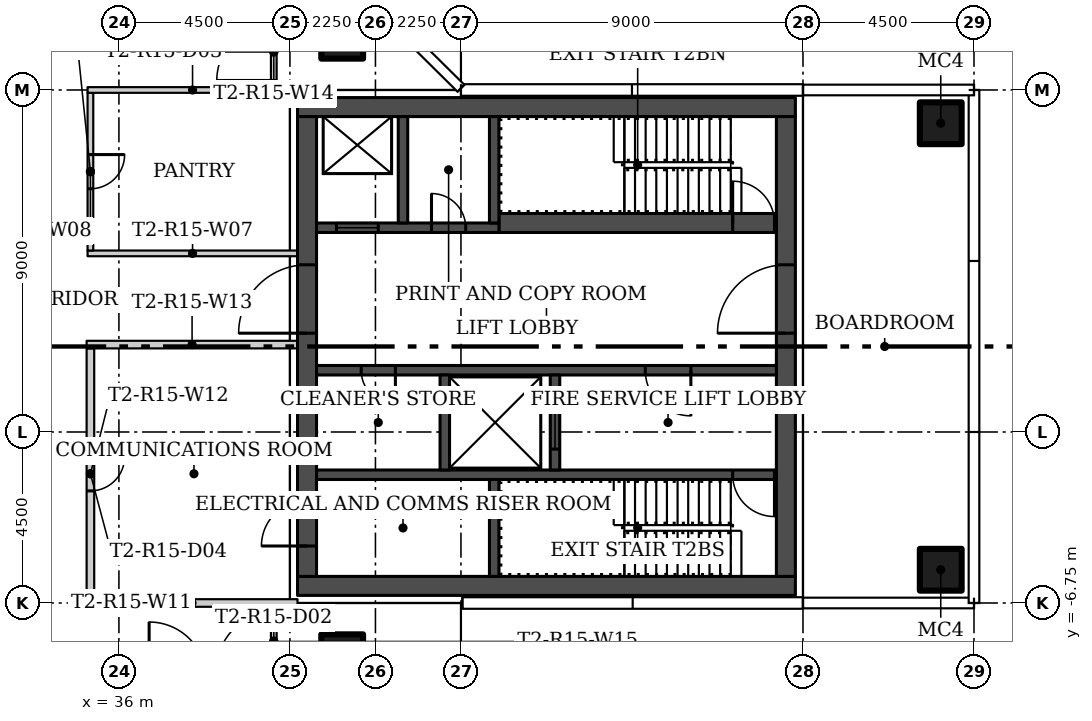
"""IFC4 building model, lengths in metres.
Left out: names, types, materials, properties, quantities, classifications, styles, units other than length and angle.
Written with IfcOpenShell. Run it as: python <this file> out.ifc"""

import sys

from ifc_helpers import new_model, si_unit, direction, frame, frame_2d, origin, origin_2d, place, context, subcontext, project, spatial, rectangle, hollow_rectangle, extrude, element, fill, save


model = new_model("IFC4")
c1 = context("Model", 3, precision=1e-05, world=origin(), true_north=direction((0.0, 1.0)))
c2 = subcontext(c1, "Body", "Model", "MODEL_VIEW")
j1 = project(units=[si_unit("LENGTHUNIT", "METRE"), si_unit("PLANEANGLEUNIT", "RADIAN")], contexts=[c1])
p1 = place(None, origin())
s1 = spatial("IfcSite", under=j1, at=p1, CompositionType="ELEMENT")
p2 = place(p1, origin())
s2 = spatial("IfcBuilding", under=s1, at=p2, CompositionType="ELEMENT")
p3 = place(p2, frame((0.0, 0.0, 142.8)))
s3 = spatial("IfcBuildingStorey", under=s2, at=p3, CompositionType="ELEMENT", Elevation=142.8)
for number, where in (
    (1, (41.875, 8.125, 0.0)),
    (2, (41.875, -8.125, 0.0)),
    (3, (57.625, -5.875, 0.0)),
    (4, (57.625, 5.875, 0.0)),
):
    element("IfcColumn", number, at=place(p3, frame(where)), inside=s3, PredefinedType="COLUMN", context=c2, shape_type="SweptSolid", body=[
        extrude(hollow_rectangle(XDim=1.1, YDim=1.1, WallThickness=0.04, at=origin_2d()), origin(), (0.0, 0.0, 1.0), 3.55),
    ])
p4 = place(p3, frame((35.175, 2.45, 0.0)))
e5 = element("IfcWall", 5, at=p4, inside=s3, PredefinedType="PARTITIONING", context=c2, shape_type="SweptSolid", body=[
    extrude(rectangle(XDim=5.525, YDim=0.15, at=frame_2d((2.762, 0.0))), origin(), (0.0, 0.0, 1.0), 3.55),
])
p5 = place(p3, frame((35.25, 6.675, 0.0), z_axis=(0.0, 0.0, 1.0), x_axis=(0.0, -1.0, 0.0)))
e6 = element("IfcWall", 6, at=p5, inside=s3, PredefinedType="PARTITIONING", context=c2, shape_type="SweptSolid", body=[
    extrude(rectangle(XDim=4.15, YDim=0.15, at=frame_2d((2.075, 0.0))), origin(), (0.0, 0.0, 1.0), 3.55),
])
p6 = place(p5, frame((1.625, 0.0, 0.0)))
e7 = element("IfcOpeningElement", 7, at=p6, cuts=e6, PredefinedType="OPENING", context=c2, shape_type="SweptSolid", body=[
    extrude(rectangle(XDim=0.9, YDim=2.1, at=frame_2d((0.45, 1.05))), frame((0.0, 0.085, 0.0), z_axis=(0.0, -1.0, 0.0), x_axis=(1.0, 0.0, 0.0)), (0.0, 0.0, 1.0), 0.17),
])
p7 = place(p3, frame((40.7, 6.75, 0.0), z_axis=(0.0, 0.0, 1.0), x_axis=(-1.0, 0.0, 0.0)))
e8 = element("IfcWall", 8, at=p7, inside=s3, PredefinedType="PARTITIONING", context=c2, shape_type="SweptSolid", body=[
    extrude(rectangle(XDim=5.525, YDim=0.15, at=frame_2d((2.762, 0.0))), origin(), (0.0, 0.0, 1.0), 3.55),
])
p8 = place(p3, frame((35.15, -6.75, 0.0)))
e9 = element("IfcWall", 9, at=p8, inside=s3, PredefinedType="PARTITIONING", context=c2, shape_type="SweptSolid", body=[
    extrude(rectangle(XDim=5.55, YDim=0.2, at=frame_2d((2.775, 0.0))), origin(), (0.0, 0.0, 1.0), 3.55),
])
p9 = place(p3, frame((35.25, -0.05, 0.0), z_axis=(0.0, 0.0, 1.0), x_axis=(0.0, -1.0, 0.0)))
e10 = element("IfcWall", 10, at=p9, inside=s3, PredefinedType="PARTITIONING", context=c2, shape_type="SweptSolid", body=[
    extrude(rectangle(XDim=6.6, YDim=0.2, at=frame_2d((3.3, 0.0))), origin(), (0.0, 0.0, 1.0), 3.55),
])
p10 = place(p9, frame((2.85, 0.0, 0.0)))
e11 = element("IfcOpeningElement", 11, at=p10, cuts=e10, PredefinedType="OPENING", context=c2, shape_type="SweptSolid", body=[
    extrude(rectangle(XDim=0.9, YDim=2.1, at=frame_2d((0.45, 1.05))), frame((0.0, 0.11, 0.0), z_axis=(0.0, -1.0, 0.0), x_axis=(1.0, 0.0, 0.0)), (0.0, 0.0, 1.0), 0.22),
])
p11 = place(p3, frame((40.7, 0.05, 0.0), z_axis=(0.0, 0.0, 1.0), x_axis=(-1.0, 0.0, 0.0)))
e12 = element("IfcWall", 12, at=p11, inside=s3, PredefinedType="PARTITIONING", context=c2, shape_type="SweptSolid", body=[
    extrude(rectangle(XDim=5.55, YDim=0.2, at=frame_2d((2.775, 0.0))), origin(), (0.0, 0.0, 1.0), 3.55),
])
p12 = place(p3, frame((40.075, 6.825, 0.0), z_axis=(0.0, 0.0, 1.0), x_axis=(0.0, 1.0, 0.0)))
e13 = element("IfcWall", 13, at=p12, inside=s3, PredefinedType="PARTITIONING", context=c2, shape_type="SweptSolid", body=[
    extrude(rectangle(XDim=1.85, YDim=0.15, at=frame_2d((0.925, 0.0))), origin(), (0.0, 0.0, 1.0), 3.55),
])
p13 = place(p12, frame((0.175, 0.0, 0.0)))
e14 = element("IfcOpeningElement", 14, at=p13, cuts=e13, PredefinedType="OPENING", context=c2, shape_type="SweptSolid", body=[
    extrude(rectangle(XDim=1.5, YDim=2.1, at=frame_2d((0.75, 1.05))), frame((0.0, 0.085, 0.0), z_axis=(0.0, -1.0, 0.0), x_axis=(1.0, 0.0, 0.0)), (0.0, 0.0, 1.0), 0.17),
])
p14 = place(p3, frame((40.075, -8.675, 0.0), z_axis=(0.0, 0.0, 1.0), x_axis=(0.0, 1.0, 0.0)))
e15 = element("IfcWall", 15, at=p14, inside=s3, PredefinedType="PARTITIONING", context=c2, shape_type="SweptSolid", body=[
    extrude(rectangle(XDim=1.825, YDim=0.15, at=frame_2d((0.913, 0.0))), origin(), (0.0, 0.0, 1.0), 3.55),
])
p15 = place(p14, frame((0.175, 0.0, 0.0)))
e16 = element("IfcOpeningElement", 16, at=p15, cuts=e15, PredefinedType="OPENING", context=c2, shape_type="SweptSolid", body=[
    extrude(rectangle(XDim=1.5, YDim=2.1, at=frame_2d((0.75, 1.05))), frame((0.0, 0.085, 0.0), z_axis=(0.0, -1.0, 0.0), x_axis=(1.0, 0.0, 0.0)), (0.0, 0.0, 1.0), 0.17),
])
for number, where, z_axis, x_axis in (
    (17, (53.8, -6.3, 0.0), (0.0, 0.0, 1.0), (-1.0, 0.0, 0.0)),
    (18, (53.8, 6.3, 0.0), (0.0, 0.0, 1.0), (-1.0, 0.0, 0.0)),
):
    element("IfcWall", number, at=place(p3, frame(where, z_axis=z_axis, x_axis=x_axis)), inside=s3, PredefinedType="SHEAR", context=c2, shape_type="SweptSolid", body=[
        extrude(rectangle(XDim=13.1, YDim=0.5, at=frame_2d((6.55, 0.0))), origin(), (0.0, 0.0, 1.0), 3.55),
    ])
p16 = place(p3, frame((53.55, -6.05, 0.0), z_axis=(0.0, 0.0, 1.0), x_axis=(0.0, 1.0, 0.0)))
e19 = element("IfcWall", 19, at=p16, inside=s3, PredefinedType="SHEAR", context=c2, shape_type="SweptSolid", body=[
    extrude(rectangle(XDim=12.1, YDim=0.5, at=frame_2d((6.05, 0.0))), origin(), (0.0, 0.0, 1.0), 3.55),
])
p17 = place(p16, frame((6.4, 0.0, 0.0)))
e20 = element("IfcOpeningElement", 20, at=p17, cuts=e19, PredefinedType="OPENING", context=c2, shape_type="SweptSolid", body=[
    extrude(rectangle(XDim=1.8, YDim=2.4, at=frame_2d((0.9, 1.2))), frame((0.0, 0.26, 0.0), z_axis=(0.0, -1.0, 0.0), x_axis=(1.0, 0.0, 0.0)), (0.0, 0.0, 1.0), 0.52),
])
p18 = place(p3, frame((40.95, -6.05, 0.0), z_axis=(0.0, 0.0, 1.0), x_axis=(0.0, 1.0, 0.0)))
e21 = element("IfcWall", 21, at=p18, inside=s3, PredefinedType="SHEAR", context=c2, shape_type="SweptSolid", body=[
    extrude(rectangle(XDim=12.1, YDim=0.5, at=frame_2d((6.05, 0.0))), origin(), (0.0, 0.0, 1.0), 3.55),
])
p19 = place(p18, frame((0.8, 0.0, 0.0)))
e22 = element("IfcOpeningElement", 22, at=p19, cuts=e21, PredefinedType="OPENING", context=c2, shape_type="SweptSolid", body=[
    extrude(rectangle(XDim=1.2, YDim=2.1, at=frame_2d((0.6, 1.05))), frame((0.0, 0.26, 0.0), z_axis=(0.0, -1.0, 0.0), x_axis=(1.0, 0.0, 0.0)), (0.0, 0.0, 1.0), 0.52),
])
p20 = place(p18, frame((6.4, 0.0, 0.0)))
e23 = element("IfcOpeningElement", 23, at=p20, cuts=e21, PredefinedType="OPENING", context=c2, shape_type="SweptSolid", body=[
    extrude(rectangle(XDim=1.8, YDim=2.4, at=frame_2d((0.9, 1.2))), frame((0.0, 0.26, 0.0), z_axis=(0.0, -1.0, 0.0), x_axis=(1.0, 0.0, 0.0)), (0.0, 0.0, 1.0), 0.52),
])
p21 = place(p3, frame((53.3, -3.375, 0.0), z_axis=(0.0, 0.0, 1.0), x_axis=(-1.0, 0.0, 0.0)))
e24 = element("IfcWall", 24, at=p21, inside=s3, PredefinedType="SHEAR", context=c2, shape_type="SweptSolid", body=[
    extrude(rectangle(XDim=12.1, YDim=0.25, at=frame_2d((6.05, 0.0))), origin(), (0.0, 0.0, 1.0), 3.55),
])
p22 = place(p21, frame((0.05, 0.0, 0.0)))
e25 = element("IfcOpeningElement", 25, at=p22, cuts=e24, PredefinedType="OPENING", context=c2, shape_type="SweptSolid", body=[
    extrude(rectangle(XDim=1.1, YDim=2.1, at=frame_2d((0.55, 1.05))), frame((0.0, 0.135, 0.0), z_axis=(0.0, -1.0, 0.0), x_axis=(1.0, 0.0, 0.0)), (0.0, 0.0, 1.0), 0.27),
])
p23 = place(p3, frame((45.875, -6.05, 0.0), z_axis=(0.0, 0.0, 1.0), x_axis=(0.0, 1.0, 0.0)))
e26 = element("IfcWall", 26, at=p23, inside=s3, PredefinedType="SHEAR", context=c2, shape_type="SweptSolid", body=[
    extrude(rectangle(XDim=2.55, YDim=0.25, at=frame_2d((1.275, 0.0))), origin(), (0.0, 0.0, 1.0), 3.55),
])
p24 = place(p3, frame((53.3, -0.625, 0.0), z_axis=(0.0, 0.0, 1.0), x_axis=(-1.0, 0.0, 0.0)))
e27 = element("IfcWall", 27, at=p24, inside=s3, PredefinedType="SHEAR", context=c2, shape_type="SweptSolid", body=[
    extrude(rectangle(XDim=12.1, YDim=0.25, at=frame_2d((6.05, 0.0))), origin(), (0.0, 0.0, 1.0), 3.55),
])
p25 = place(p24, frame((2.25, 0.0, 0.0)))
e28 = element("IfcOpeningElement", 28, at=p25, cuts=e27, PredefinedType="OPENING", context=c2, shape_type="SweptSolid", body=[
    extrude(rectangle(XDim=1.2, YDim=2.1, at=frame_2d((0.6, 1.05))), frame((0.0, 0.135, 0.0), z_axis=(0.0, -1.0, 0.0), x_axis=(1.0, 0.0, 0.0)), (0.0, 0.0, 1.0), 0.27),
])
p26 = place(p24, frame((10.025, 0.0, 0.0)))
e29 = element("IfcOpeningElement", 29, at=p26, cuts=e27, PredefinedType="OPENING", context=c2, shape_type="SweptSolid", body=[
    extrude(rectangle(XDim=0.9, YDim=2.1, at=frame_2d((0.45, 1.05))), frame((0.0, 0.135, 0.0), z_axis=(0.0, -1.0, 0.0), x_axis=(1.0, 0.0, 0.0)), (0.0, 0.0, 1.0), 0.27),
])
p27 = place(p3, frame((47.475, -3.25, 0.0), z_axis=(0.0, 0.0, 1.0), x_axis=(0.0, 1.0, 0.0)))
e30 = element("IfcWall", 30, at=p27, inside=s3, PredefinedType="SHEAR", context=c2, shape_type="SweptSolid", body=[
    extrude(rectangle(XDim=2.5, YDim=0.25, at=frame_2d((1.25, 0.0))), origin(), (0.0, 0.0, 1.0), 3.55),
])
p28 = place(p27, frame((0.55, 0.0, 0.0)))
e31 = element("IfcOpeningElement", 31, at=p28, cuts=e30, PredefinedType="OPENING", context=c2, shape_type="SweptSolid", body=[
    extrude(rectangle(XDim=1.4, YDim=2.4, at=frame_2d((0.7, 1.2))), frame((0.0, 0.135, 0.0), z_axis=(0.0, -1.0, 0.0), x_axis=(1.0, 0.0, 0.0)), (0.0, 0.0, 1.0), 0.27),
])
p29 = place(p3, frame((44.575, -3.25, 0.0), z_axis=(0.0, 0.0, 1.0), x_axis=(0.0, 1.0, 0.0)))
e32 = element("IfcWall", 32, at=p29, inside=s3, PredefinedType="SHEAR", context=c2, shape_type="SweptSolid", body=[
    extrude(rectangle(XDim=2.5, YDim=0.25, at=frame_2d((1.25, 0.0))), origin(), (0.0, 0.0, 1.0), 3.55),
])
p30 = place(p3, frame((46.0, 3.25, 0.0)))
e33 = element("IfcWall", 33, at=p30, inside=s3, PredefinedType="SHEAR", context=c2, shape_type="SweptSolid", body=[
    extrude(rectangle(XDim=7.3, YDim=0.5, at=frame_2d((3.65, 0.0))), origin(), (0.0, 0.0, 1.0), 3.55),
])
p31 = place(p30, frame((6.15, 0.0, 0.0)))
e34 = element("IfcOpeningElement", 34, at=p31, cuts=e33, PredefinedType="OPENING", context=c2, shape_type="SweptSolid", body=[
    extrude(rectangle(XDim=1.1, YDim=2.1, at=frame_2d((0.55, 1.05))), frame((0.0, 0.26, 0.0), z_axis=(0.0, -1.0, 0.0), x_axis=(1.0, 0.0, 0.0)), (0.0, 0.0, 1.0), 0.52),
])
p32 = place(p3, frame((41.2, 3.125, 0.0)))
e35 = element("IfcWall", 35, at=p32, inside=s3, PredefinedType="SHEAR", context=c2, shape_type="SweptSolid", body=[
    extrude(rectangle(XDim=4.8, YDim=0.25, at=frame_2d((2.4, 0.0))), origin(), (0.0, 0.0, 1.0), 3.55),
])
p33 = place(p32, frame((0.525, 0.0, 0.0)))
e36 = element("IfcOpeningElement", 36, at=p33, cuts=e35, PredefinedType="OPENING", context=c2, shape_type="SweptSolid", body=[
    extrude(rectangle(XDim=1.1, YDim=2.1, at=frame_2d((0.55, 1.05))), frame((0.0, 0.135, 0.0), z_axis=(0.0, -1.0, 0.0), x_axis=(1.0, 0.0, 0.0)), (0.0, 0.0, 1.0), 0.27),
])
p34 = place(p32, frame((3.025, 0.0, 0.0)))
e37 = element("IfcOpeningElement", 37, at=p34, cuts=e35, PredefinedType="OPENING", context=c2, shape_type="SweptSolid", body=[
    extrude(rectangle(XDim=0.9, YDim=2.1, at=frame_2d((0.45, 1.05))), frame((0.0, 0.135, 0.0), z_axis=(0.0, -1.0, 0.0), x_axis=(1.0, 0.0, 0.0)), (0.0, 0.0, 1.0), 0.27),
])
for number, where, z_axis, x_axis in (
    (38, (45.875, 3.25, 0.0), (0.0, 0.0, 1.0), (0.0, 1.0, 0.0)),
    (39, (43.475, 3.25, 0.0), (0.0, 0.0, 1.0), (0.0, 1.0, 0.0)),
):
    element("IfcWall", number, at=place(p3, frame(where, z_axis=z_axis, x_axis=x_axis)), inside=s3, PredefinedType="SHEAR", context=c2, shape_type="SweptSolid", body=[
        extrude(rectangle(XDim=2.8, YDim=0.25, at=frame_2d((1.4, 0.0))), origin(), (0.0, 0.0, 1.0), 3.55),
    ])
p35 = place(p15, origin())
e40 = element("IfcDoor", 40, at=p35, inside=s3, OperationType="DOUBLE_DOOR_SINGLE_SWING", PredefinedType="DOOR", context=c2, shape_type="SweptSolid", body=[
    extrude(rectangle(XDim=1.5, YDim=2.1, at=frame_2d((0.75, 1.05))), frame((0.0, 0.025, 0.0), z_axis=(0.0, -1.0, 0.0), x_axis=(1.0, 0.0, 0.0)), (0.0, 0.0, 1.0), 0.05),
])
fill(e16, e40)
p36 = place(p13, origin())
e41 = element("IfcDoor", 41, at=p36, inside=s3, OperationType="DOUBLE_DOOR_SINGLE_SWING", PredefinedType="DOOR", context=c2, shape_type="SweptSolid", body=[
    extrude(rectangle(XDim=1.5, YDim=2.1, at=frame_2d((0.75, 1.05))), frame((0.0, 0.025, 0.0), z_axis=(0.0, -1.0, 0.0), x_axis=(1.0, 0.0, 0.0)), (0.0, 0.0, 1.0), 0.05),
])
fill(e14, e41)
p37 = place(p10, origin())
e42 = element("IfcDoor", 42, at=p37, inside=s3, OperationType="SINGLE_SWING_LEFT", PredefinedType="DOOR", context=c2, shape_type="SweptSolid", body=[
    extrude(rectangle(XDim=0.9, YDim=2.1, at=frame_2d((0.45, 1.05))), frame((0.0, 0.025, 0.0), z_axis=(0.0, -1.0, 0.0), x_axis=(1.0, 0.0, 0.0)), (0.0, 0.0, 1.0), 0.05),
])
fill(e11, e42)
p38 = place(p6, origin())
e43 = element("IfcDoor", 43, at=p38, inside=s3, OperationType="SINGLE_SWING_RIGHT", PredefinedType="DOOR", context=c2, shape_type="SweptSolid", body=[
    extrude(rectangle(XDim=0.9, YDim=2.1, at=frame_2d((0.45, 1.05))), frame((0.0, 0.025, 0.0), z_axis=(0.0, -1.0, 0.0), x_axis=(1.0, 0.0, 0.0)), (0.0, 0.0, 1.0), 0.05),
])
fill(e7, e43)
p39 = place(p17, origin())
e44 = element("IfcDoor", 44, at=p39, inside=s3, OperationType="DOUBLE_DOOR_SINGLE_SWING", PredefinedType="DOOR", context=c2, shape_type="SweptSolid", body=[
    extrude(rectangle(XDim=1.8, YDim=2.4, at=frame_2d((0.9, 1.2))), frame((0.0, 0.025, 0.0), z_axis=(0.0, -1.0, 0.0), x_axis=(1.0, 0.0, 0.0)), (0.0, 0.0, 1.0), 0.05),
])
fill(e20, e44)
p40 = place(p19, origin())
e45 = element("IfcDoor", 45, at=p40, inside=s3, OperationType="SINGLE_SWING_LEFT", PredefinedType="DOOR", context=c2, shape_type="SweptSolid", body=[
    extrude(rectangle(XDim=1.2, YDim=2.1, at=frame_2d((0.6, 1.05))), frame((0.0, 0.025, 0.0), z_axis=(0.0, -1.0, 0.0), x_axis=(1.0, 0.0, 0.0)), (0.0, 0.0, 1.0), 0.05),
])
fill(e22, e45)
p41 = place(p20, origin())
e46 = element("IfcDoor", 46, at=p41, inside=s3, OperationType="DOUBLE_DOOR_SINGLE_SWING", PredefinedType="DOOR", context=c2, shape_type="SweptSolid", body=[
    extrude(rectangle(XDim=1.8, YDim=2.4, at=frame_2d((0.9, 1.2))), frame((0.0, 0.025, 0.0), z_axis=(0.0, -1.0, 0.0), x_axis=(1.0, 0.0, 0.0)), (0.0, 0.0, 1.0), 0.05),
])
fill(e23, e46)
p42 = place(p22, origin())
e47 = element("IfcDoor", 47, at=p42, inside=s3, OperationType="SINGLE_SWING_LEFT", PredefinedType="DOOR", context=c2, shape_type="SweptSolid", body=[
    extrude(rectangle(XDim=1.1, YDim=2.1, at=frame_2d((0.55, 1.05))), frame((0.0, 0.025, 0.0), z_axis=(0.0, -1.0, 0.0), x_axis=(1.0, 0.0, 0.0)), (0.0, 0.0, 1.0), 0.05),
])
fill(e25, e47)
p43 = place(p25, origin())
e48 = element("IfcDoor", 48, at=p43, inside=s3, OperationType="SINGLE_SWING_LEFT", PredefinedType="DOOR", context=c2, shape_type="SweptSolid", body=[
    extrude(rectangle(XDim=1.2, YDim=2.1, at=frame_2d((0.6, 1.05))), frame((0.0, 0.025, 0.0), z_axis=(0.0, -1.0, 0.0), x_axis=(1.0, 0.0, 0.0)), (0.0, 0.0, 1.0), 0.05),
])
fill(e28, e48)
p44 = place(p26, origin())
e49 = element("IfcDoor", 49, at=p44, inside=s3, OperationType="SINGLE_SWING_RIGHT", PredefinedType="DOOR", context=c2, shape_type="SweptSolid", body=[
    extrude(rectangle(XDim=0.9, YDim=2.1, at=frame_2d((0.45, 1.05))), frame((0.0, 0.025, 0.0), z_axis=(0.0, -1.0, 0.0), x_axis=(1.0, 0.0, 0.0)), (0.0, 0.0, 1.0), 0.05),
])
fill(e29, e49)
p45 = place(p28, origin())
e50 = element("IfcDoor", 50, at=p45, inside=s3, OperationType="SLIDING_TO_LEFT", PredefinedType="DOOR", context=c2, shape_type="SweptSolid", body=[
    extrude(rectangle(XDim=1.4, YDim=2.4, at=frame_2d((0.7, 1.2))), frame((0.0, 0.025, 0.0), z_axis=(0.0, -1.0, 0.0), x_axis=(1.0, 0.0, 0.0)), (0.0, 0.0, 1.0), 0.05),
])
fill(e31, e50)
p46 = place(p31, origin())
e51 = element("IfcDoor", 51, at=p46, inside=s3, OperationType="SINGLE_SWING_RIGHT", PredefinedType="DOOR", context=c2, shape_type="SweptSolid", body=[
    extrude(rectangle(XDim=1.1, YDim=2.1, at=frame_2d((0.55, 1.05))), frame((0.0, 0.025, 0.0), z_axis=(0.0, -1.0, 0.0), x_axis=(1.0, 0.0, 0.0)), (0.0, 0.0, 1.0), 0.05),
])
fill(e34, e51)
p47 = place(p33, origin())
e52 = element("IfcDoor", 52, at=p47, inside=s3, OperationType="SLIDING_TO_LEFT", PredefinedType="DOOR", context=c2, shape_type="SweptSolid", body=[
    extrude(rectangle(XDim=1.1, YDim=2.1, at=frame_2d((0.55, 1.05))), frame((0.0, 0.025, 0.0), z_axis=(0.0, -1.0, 0.0), x_axis=(1.0, 0.0, 0.0)), (0.0, 0.0, 1.0), 0.05),
])
fill(e36, e52)
p48 = place(p34, origin())
e53 = element("IfcDoor", 53, at=p48, inside=s3, OperationType="SINGLE_SWING_RIGHT", PredefinedType="DOOR", context=c2, shape_type="SweptSolid", body=[
    extrude(rectangle(XDim=0.9, YDim=2.1, at=frame_2d((0.45, 1.05))), frame((0.0, 0.025, 0.0), z_axis=(0.0, -1.0, 0.0), x_axis=(1.0, 0.0, 0.0)), (0.0, 0.0, 1.0), 0.05),
])
fill(e37, e53)
save(model, sys.argv[1])
